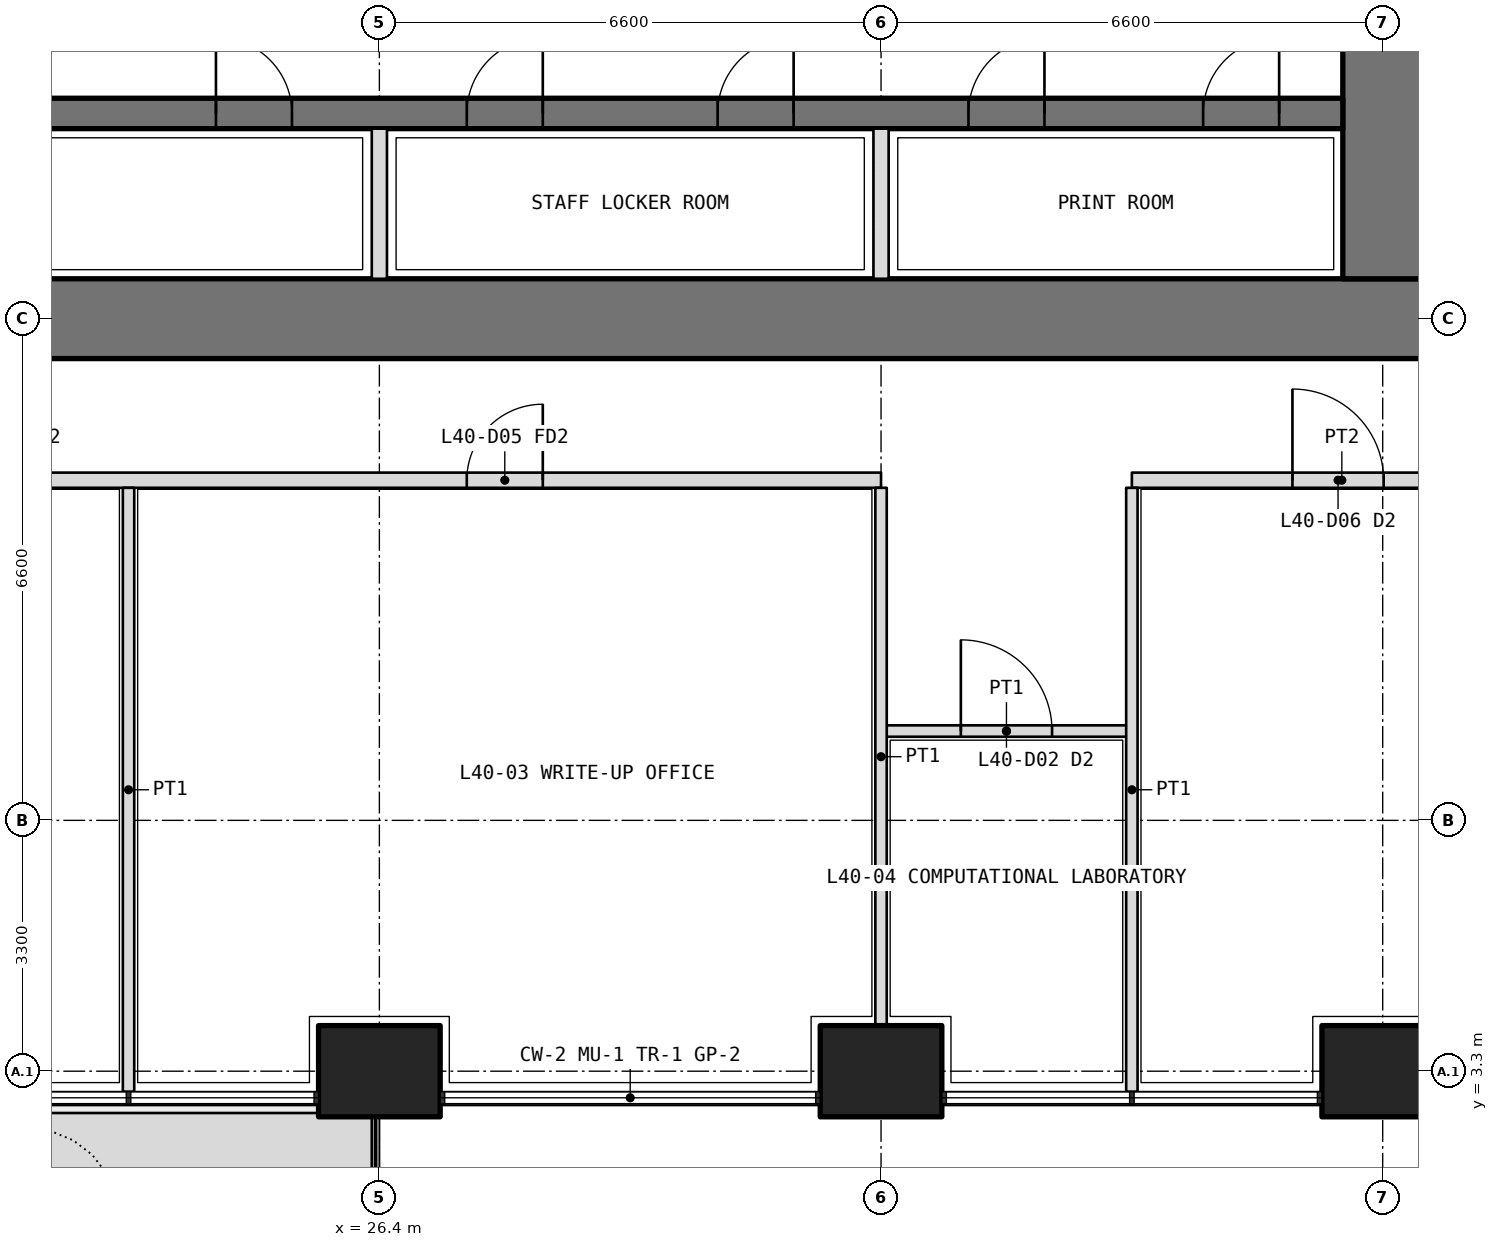
"""IFC4 building model, lengths in metres.
Left out: names, types, materials, properties, quantities, classifications, styles, units other than length and angle.
Written with IfcOpenShell. Run it as: python <this file> out.ifc"""

import sys

from ifc_helpers import new_model, si_unit, direction, frame, frame_2d, origin, origin_2d, place, context, subcontext, project, spatial, polyline, rectangle, outline, extrude, element, fill, save


model = new_model("IFC4")
c1 = context("Model", 3, precision=1e-05, world=origin(), true_north=direction((0.0, 1.0)))
c2 = subcontext(c1, "Body", "Model", "MODEL_VIEW")
j1 = project(units=[si_unit("LENGTHUNIT", "METRE"), si_unit("PLANEANGLEUNIT", "RADIAN")], contexts=[c1])
p1 = place(None, origin())
s1 = spatial("IfcSite", under=j1, at=p1, CompositionType="ELEMENT")
p2 = place(p1, origin())
s2 = spatial("IfcBuilding", under=s1, at=p2, CompositionType="ELEMENT")
p3 = place(p2, frame((0.0, 0.0, 176.7)))
s3 = spatial("IfcBuildingStorey", under=s2, at=p3, CompositionType="ELEMENT", Elevation=176.7)
for number, where, z_axis, x_axis in (
    (1, (26.4, 3.3, 0.0), (0.0, 0.0, 1.0), (1.0, 0.0, 0.0)),
    (2, (33.0, 3.3, 0.0), (0.0, 0.0, 1.0), (1.0, 0.0, 0.0)),
    (3, (39.6, 3.3, 0.0), (0.0, 0.0, 1.0), (1.0, 0.0, 0.0)),
):
    element("IfcColumn", number, at=place(p3, frame(where, z_axis=z_axis, x_axis=x_axis)), inside=s3, PredefinedType="COLUMN", context=c2, shape_type="SweptSolid", body=[
        extrude(rectangle(XDim=1.6, YDim=1.2, at=origin_2d()), origin(), (0.0, 0.0, 1.0), 4.2),
    ])
p4 = place(p3, origin())
e4 = element("IfcWall", 4, at=p4, inside=s3, PredefinedType="USERDEFINED", context=c2, shape_type="SweptSolid", body=[
    extrude(outline(polyline([(17.25, 1.75), (26.3, 1.75), (26.3, 2.75), (17.25, 2.75), (17.25, 1.75)]), holes=[polyline([(17.4, 1.9), (26.15, 1.9), (26.15, 2.6), (17.4, 2.6), (17.4, 1.9)])]), origin(), (0.0, 0.0, 1.0), 1.05),
])
p5 = place(p3, frame((12.675, 13.2, 0.0), z_axis=(0.0, 0.0, 1.0), x_axis=(1.0, 0.0, 0.0)))
e5 = element("IfcWall", 5, at=p5, inside=s3, PredefinedType="SHEAR", context=c2, shape_type="SweptSolid", body=[
    extrude(rectangle(XDim=27.45, YDim=1.05, at=frame_2d((13.725, 0.0))), origin(), (0.0, 0.0, 1.0), 4.2),
])
p6 = place(p3, frame((39.6, 13.725, 0.0), z_axis=(0.0, 0.0, 1.0), x_axis=(0.0, 1.0, 0.0)))
e6 = element("IfcWall", 6, at=p6, inside=s3, PredefinedType="SHEAR", context=c2, shape_type="SweptSolid", body=[
    extrude(rectangle(XDim=18.75, YDim=1.05, at=frame_2d((9.375, 0.0))), origin(), (0.0, 0.0, 1.0), 4.2),
])
p7 = place(p6, frame((3.025, 0.0, 0.0)))
e7 = element("IfcOpeningElement", 7, at=p7, cuts=e6, PredefinedType="OPENING", context=c2, shape_type="SweptSolid", body=[
    extrude(rectangle(XDim=1.6, YDim=2.1, at=frame_2d((0.8, 1.05))), frame((0.0, 0.535, 0.0), z_axis=(0.0, -1.0, 0.0), x_axis=(1.0, 0.0, 0.0)), (0.0, 0.0, 1.0), 1.07),
])
p8 = place(p6, frame((13.825, 0.0, 0.0)))
e8 = element("IfcOpeningElement", 8, at=p8, cuts=e6, PredefinedType="OPENING", context=c2, shape_type="SweptSolid", body=[
    extrude(rectangle(XDim=1.6, YDim=2.1, at=frame_2d((0.8, 1.05))), frame((0.0, 0.535, 0.0), z_axis=(0.0, -1.0, 0.0), x_axis=(1.0, 0.0, 0.0)), (0.0, 0.0, 1.0), 1.07),
])
p9 = place(p3, frame((13.725, 15.9, 0.0), z_axis=(0.0, 0.0, 1.0), x_axis=(1.0, 0.0, 0.0)))
e9 = element("IfcWall", 9, at=p9, inside=s3, PredefinedType="SHEAR", context=c2, shape_type="SweptSolid", body=[
    extrude(rectangle(XDim=25.35, YDim=0.4, at=frame_2d((12.675, 0.0))), origin(), (0.0, 0.0, 1.0), 4.2),
])
p10 = place(p9, frame((0.837, 0.0, 0.0)))
e10 = element("IfcOpeningElement", 10, at=p10, cuts=e9, PredefinedType="OPENING", context=c2, shape_type="SweptSolid", body=[
    extrude(rectangle(XDim=1.0, YDim=2.1, at=frame_2d((0.5, 1.05))), frame((0.0, 0.21, 0.0), z_axis=(0.0, -1.0, 0.0), x_axis=(1.0, 0.0, 0.0)), (0.0, 0.0, 1.0), 0.42),
])
p11 = place(p9, frame((3.925, 0.0, 0.0)))
e11 = element("IfcOpeningElement", 11, at=p11, cuts=e9, PredefinedType="OPENING", context=c2, shape_type="SweptSolid", body=[
    extrude(rectangle(XDim=1.0, YDim=2.1, at=frame_2d((0.5, 1.05))), frame((0.0, 0.21, 0.0), z_axis=(0.0, -1.0, 0.0), x_axis=(1.0, 0.0, 0.0)), (0.0, 0.0, 1.0), 0.42),
])
p12 = place(p9, frame((7.225, 0.0, 0.0)))
e12 = element("IfcOpeningElement", 12, at=p12, cuts=e9, PredefinedType="OPENING", context=c2, shape_type="SweptSolid", body=[
    extrude(rectangle(XDim=1.0, YDim=2.1, at=frame_2d((0.5, 1.05))), frame((0.0, 0.21, 0.0), z_axis=(0.0, -1.0, 0.0), x_axis=(1.0, 0.0, 0.0)), (0.0, 0.0, 1.0), 0.42),
])
p13 = place(p9, frame((10.525, 0.0, 0.0)))
e13 = element("IfcOpeningElement", 13, at=p13, cuts=e9, PredefinedType="OPENING", context=c2, shape_type="SweptSolid", body=[
    extrude(rectangle(XDim=1.0, YDim=2.1, at=frame_2d((0.5, 1.05))), frame((0.0, 0.21, 0.0), z_axis=(0.0, -1.0, 0.0), x_axis=(1.0, 0.0, 0.0)), (0.0, 0.0, 1.0), 0.42),
])
p14 = place(p9, frame((13.825, 0.0, 0.0)))
e14 = element("IfcOpeningElement", 14, at=p14, cuts=e9, PredefinedType="OPENING", context=c2, shape_type="SweptSolid", body=[
    extrude(rectangle(XDim=1.0, YDim=2.1, at=frame_2d((0.5, 1.05))), frame((0.0, 0.21, 0.0), z_axis=(0.0, -1.0, 0.0), x_axis=(1.0, 0.0, 0.0)), (0.0, 0.0, 1.0), 0.42),
])
p15 = place(p9, frame((17.125, 0.0, 0.0)))
e15 = element("IfcOpeningElement", 15, at=p15, cuts=e9, PredefinedType="OPENING", context=c2, shape_type="SweptSolid", body=[
    extrude(rectangle(XDim=1.0, YDim=2.1, at=frame_2d((0.5, 1.05))), frame((0.0, 0.21, 0.0), z_axis=(0.0, -1.0, 0.0), x_axis=(1.0, 0.0, 0.0)), (0.0, 0.0, 1.0), 0.42),
])
p16 = place(p9, frame((20.425, 0.0, 0.0)))
e16 = element("IfcOpeningElement", 16, at=p16, cuts=e9, PredefinedType="OPENING", context=c2, shape_type="SweptSolid", body=[
    extrude(rectangle(XDim=1.0, YDim=2.1, at=frame_2d((0.5, 1.05))), frame((0.0, 0.21, 0.0), z_axis=(0.0, -1.0, 0.0), x_axis=(1.0, 0.0, 0.0)), (0.0, 0.0, 1.0), 0.42),
])
p17 = place(p9, frame((23.512, 0.0, 0.0)))
e17 = element("IfcOpeningElement", 17, at=p17, cuts=e9, PredefinedType="OPENING", context=c2, shape_type="SweptSolid", body=[
    extrude(rectangle(XDim=1.0, YDim=2.1, at=frame_2d((0.5, 1.05))), frame((0.0, 0.21, 0.0), z_axis=(0.0, -1.0, 0.0), x_axis=(1.0, 0.0, 0.0)), (0.0, 0.0, 1.0), 0.42),
])
for number, where, z_axis, x_axis in (
    (18, (26.4, 13.725, 0.0), (0.0, 0.0, 1.0), (0.0, 1.0, 0.0)),
    (19, (33.0, 13.725, 0.0), (0.0, 0.0, 1.0), (0.0, 1.0, 0.0)),
):
    element("IfcWall", number, at=place(p3, frame(where, z_axis=z_axis, x_axis=x_axis)), inside=s3, PredefinedType="PARTITIONING", context=c2, shape_type="SweptSolid", body=[
        extrude(rectangle(XDim=1.975, YDim=0.2, at=frame_2d((0.987, 0.0))), origin(), (0.0, 0.0, 1.0), 4.2),
    ])
p18 = place(p3, frame((10.975, 11.075, 0.0), z_axis=(0.0, 0.0, 1.0), x_axis=(1.0, 0.0, 0.0)))
e20 = element("IfcWall", 20, at=p18, inside=s3, PredefinedType="PARTITIONING", context=c2, shape_type="SweptSolid", body=[
    extrude(rectangle(XDim=22.025, YDim=0.2, at=frame_2d((11.012, 0.0))), origin(), (0.0, 0.0, 1.0), 2.85),
])
p19 = place(p18, frame((0.562, 0.0, 0.0)))
e21 = element("IfcOpeningElement", 21, at=p19, cuts=e20, PredefinedType="OPENING", context=c2, shape_type="SweptSolid", body=[
    extrude(rectangle(XDim=1.2, YDim=2.1, at=frame_2d((0.6, 1.05))), frame((0.0, 0.11, 0.0), z_axis=(0.0, -1.0, 0.0), x_axis=(1.0, 0.0, 0.0)), (0.0, 0.0, 1.0), 0.22),
])
p20 = place(p18, frame((6.675, 0.0, 0.0)))
e22 = element("IfcOpeningElement", 22, at=p20, cuts=e20, PredefinedType="OPENING", context=c2, shape_type="SweptSolid", body=[
    extrude(rectangle(XDim=1.0, YDim=2.1, at=frame_2d((0.5, 1.05))), frame((0.0, 0.11, 0.0), z_axis=(0.0, -1.0, 0.0), x_axis=(1.0, 0.0, 0.0)), (0.0, 0.0, 1.0), 0.22),
])
p21 = place(p18, frame((16.575, 0.0, 0.0)))
e23 = element("IfcOpeningElement", 23, at=p21, cuts=e20, PredefinedType="OPENING", context=c2, shape_type="SweptSolid", body=[
    extrude(rectangle(XDim=1.0, YDim=2.1, at=frame_2d((0.5, 1.05))), frame((0.0, 0.11, 0.0), z_axis=(0.0, -1.0, 0.0), x_axis=(1.0, 0.0, 0.0)), (0.0, 0.0, 1.0), 0.22),
])
p22 = place(p3, frame((36.3, 11.075, 0.0), z_axis=(0.0, 0.0, 1.0), x_axis=(1.0, 0.0, 0.0)))
e24 = element("IfcWall", 24, at=p22, inside=s3, PredefinedType="PARTITIONING", context=c2, shape_type="SweptSolid", body=[
    extrude(rectangle(XDim=5.525, YDim=0.2, at=frame_2d((2.762, 0.0))), origin(), (0.0, 0.0, 1.0), 2.85),
])
p23 = place(p22, frame((2.113, 0.0, 0.0)))
e25 = element("IfcOpeningElement", 25, at=p23, cuts=e24, PredefinedType="OPENING", context=c2, shape_type="SweptSolid", body=[
    extrude(rectangle(XDim=1.2, YDim=2.1, at=frame_2d((0.6, 1.05))), frame((0.0, 0.11, 0.0), z_axis=(0.0, -1.0, 0.0), x_axis=(1.0, 0.0, 0.0)), (0.0, 0.0, 1.0), 0.22),
])
p24 = place(p3, frame((33.0, 7.775, 0.0), z_axis=(0.0, 0.0, 1.0), x_axis=(1.0, 0.0, 0.0)))
e26 = element("IfcWall", 26, at=p24, inside=s3, PredefinedType="PARTITIONING", context=c2, shape_type="SweptSolid", body=[
    extrude(rectangle(XDim=3.3, YDim=0.15, at=frame_2d((1.65, 0.0))), origin(), (0.0, 0.0, 1.0), 2.85),
])
p25 = place(p24, frame((1.05, 0.0, 0.0)))
e27 = element("IfcOpeningElement", 27, at=p25, cuts=e26, PredefinedType="OPENING", context=c2, shape_type="SweptSolid", body=[
    extrude(rectangle(XDim=1.2, YDim=2.1, at=frame_2d((0.6, 1.05))), frame((0.0, 0.085, 0.0), z_axis=(0.0, -1.0, 0.0), x_axis=(1.0, 0.0, 0.0)), (0.0, 0.0, 1.0), 0.17),
])
p26 = place(p3, frame((23.1, 3.03, 0.0), z_axis=(0.0, 0.0, 1.0), x_axis=(0.0, 1.0, 0.0)))
e28 = element("IfcWall", 28, at=p26, inside=s3, PredefinedType="PARTITIONING", context=c2, shape_type="SweptSolid", body=[
    extrude(rectangle(XDim=7.945, YDim=0.15, at=frame_2d((3.973, 0.0))), origin(), (0.0, 0.0, 1.0), 2.7),
])
p27 = place(p3, frame((33.0, 3.9, 0.0), z_axis=(0.0, 0.0, 1.0), x_axis=(0.0, 1.0, 0.0)))
e29 = element("IfcWall", 29, at=p27, inside=s3, PredefinedType="PARTITIONING", context=c2, shape_type="SweptSolid", body=[
    extrude(rectangle(XDim=7.075, YDim=0.15, at=frame_2d((3.538, 0.0))), origin(), (0.0, 0.0, 1.0), 2.85),
])
p28 = place(p3, frame((36.3, 3.03, 0.0), z_axis=(0.0, 0.0, 1.0), x_axis=(0.0, 1.0, 0.0)))
e30 = element("IfcWall", 30, at=p28, inside=s3, PredefinedType="PARTITIONING", context=c2, shape_type="SweptSolid", body=[
    extrude(rectangle(XDim=7.945, YDim=0.15, at=frame_2d((3.973, 0.0))), origin(), (0.0, 0.0, 1.0), 2.7),
])
p29 = place(p21, origin())
e31 = element("IfcDoor", 31, at=p29, inside=s3, OperationType="SINGLE_SWING_RIGHT", PredefinedType="DOOR", context=c2, shape_type="SweptSolid", body=[
    extrude(rectangle(XDim=1.0, YDim=2.1, at=frame_2d((0.5, 1.05))), frame((0.0, 0.025, 0.0), z_axis=(0.0, -1.0, 0.0), x_axis=(1.0, 0.0, 0.0)), (0.0, 0.0, 1.0), 0.05),
])
fill(e23, e31)
p30 = place(p25, origin())
e32 = element("IfcDoor", 32, at=p30, inside=s3, OperationType="DOUBLE_DOOR_SINGLE_SWING", PredefinedType="DOOR", context=c2, shape_type="SweptSolid", body=[
    extrude(rectangle(XDim=1.2, YDim=2.1, at=frame_2d((0.6, 1.05))), frame((0.0, 0.025, 0.0), z_axis=(0.0, -1.0, 0.0), x_axis=(1.0, 0.0, 0.0)), (0.0, 0.0, 1.0), 0.05),
])
fill(e27, e32)
p31 = place(p23, origin())
e33 = element("IfcDoor", 33, at=p31, inside=s3, OperationType="DOUBLE_DOOR_SINGLE_SWING", PredefinedType="DOOR", context=c2, shape_type="SweptSolid", body=[
    extrude(rectangle(XDim=1.2, YDim=2.1, at=frame_2d((0.6, 1.05))), frame((0.0, 0.025, 0.0), z_axis=(0.0, -1.0, 0.0), x_axis=(1.0, 0.0, 0.0)), (0.0, 0.0, 1.0), 0.05),
])
fill(e25, e33)
p32 = place(p13, origin())
e34 = element("IfcDoor", 34, at=p32, inside=s3, OperationType="SINGLE_SWING_LEFT", PredefinedType="DOOR", context=c2, shape_type="SweptSolid", body=[
    extrude(rectangle(XDim=1.0, YDim=2.1, at=frame_2d((0.5, 1.05))), frame((0.0, 0.025, 0.0), z_axis=(0.0, -1.0, 0.0), x_axis=(1.0, 0.0, 0.0)), (0.0, 0.0, 1.0), 0.05),
])
fill(e13, e34)
p33 = place(p14, origin())
e35 = element("IfcDoor", 35, at=p33, inside=s3, OperationType="SINGLE_SWING_RIGHT", PredefinedType="DOOR", context=c2, shape_type="SweptSolid", body=[
    extrude(rectangle(XDim=1.0, YDim=2.1, at=frame_2d((0.5, 1.05))), frame((0.0, 0.025, 0.0), z_axis=(0.0, -1.0, 0.0), x_axis=(1.0, 0.0, 0.0)), (0.0, 0.0, 1.0), 0.05),
])
fill(e14, e35)
p34 = place(p15, origin())
e36 = element("IfcDoor", 36, at=p34, inside=s3, OperationType="SINGLE_SWING_RIGHT", PredefinedType="DOOR", context=c2, shape_type="SweptSolid", body=[
    extrude(rectangle(XDim=1.0, YDim=2.1, at=frame_2d((0.5, 1.05))), frame((0.0, 0.025, 0.0), z_axis=(0.0, -1.0, 0.0), x_axis=(1.0, 0.0, 0.0)), (0.0, 0.0, 1.0), 0.05),
])
fill(e15, e36)
p35 = place(p16, origin())
e37 = element("IfcDoor", 37, at=p35, inside=s3, OperationType="SINGLE_SWING_RIGHT", PredefinedType="DOOR", context=c2, shape_type="SweptSolid", body=[
    extrude(rectangle(XDim=1.0, YDim=2.1, at=frame_2d((0.5, 1.05))), frame((0.0, 0.025, 0.0), z_axis=(0.0, -1.0, 0.0), x_axis=(1.0, 0.0, 0.0)), (0.0, 0.0, 1.0), 0.05),
])
fill(e16, e37)
p36 = place(p17, origin())
e38 = element("IfcDoor", 38, at=p36, inside=s3, OperationType="SINGLE_SWING_RIGHT", PredefinedType="DOOR", context=c2, shape_type="SweptSolid", body=[
    extrude(rectangle(XDim=1.0, YDim=2.1, at=frame_2d((0.5, 1.05))), frame((0.0, 0.025, 0.0), z_axis=(0.0, -1.0, 0.0), x_axis=(1.0, 0.0, 0.0)), (0.0, 0.0, 1.0), 0.05),
])
fill(e17, e38)
save(model, sys.argv[1])
